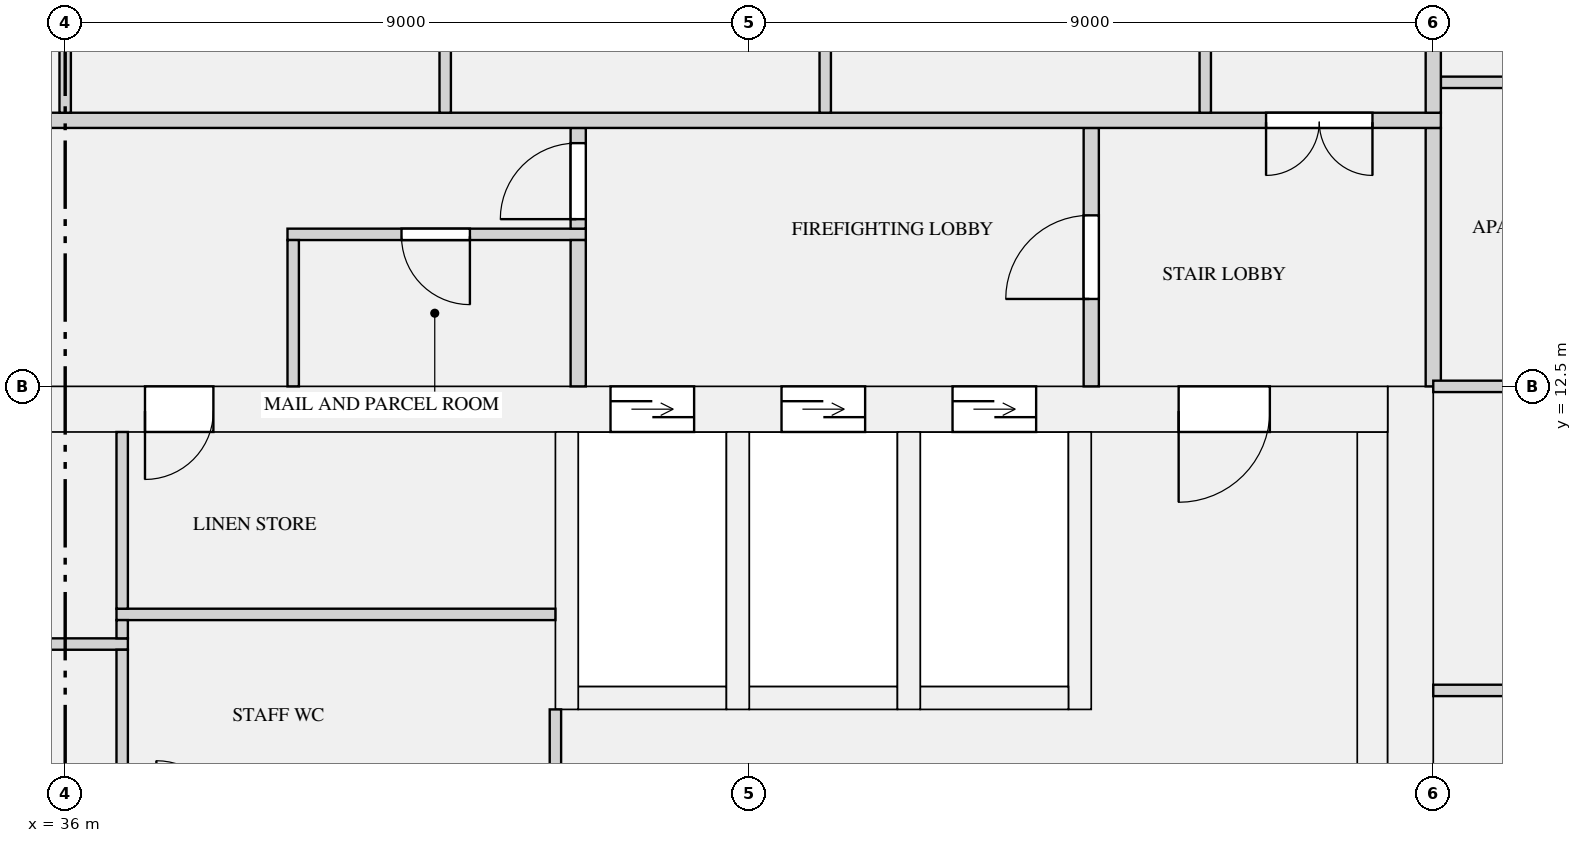
"""IFC4 building model, lengths in metres.
Left out: names, types, materials, properties, quantities, classifications, styles, units other than length and angle.
Written with IfcOpenShell. Run it as: python <this file> out.ifc"""

import sys

from ifc_helpers import new_model, si_unit, direction, frame, frame_2d, origin, place, context, subcontext, project, spatial, rectangle, extrude, element, fill, save


model = new_model("IFC4")
c1 = context("Model", 3, precision=1e-05, world=origin(), true_north=direction((0.0, 1.0)))
c2 = subcontext(c1, "Body", "Model", "MODEL_VIEW")
j1 = project(units=[si_unit("LENGTHUNIT", "METRE"), si_unit("PLANEANGLEUNIT", "RADIAN")], contexts=[c1])
p1 = place(None, origin())
s1 = spatial("IfcSite", under=j1, at=p1, CompositionType="ELEMENT")
p2 = place(p1, origin())
s2 = spatial("IfcBuilding", under=s1, at=p2, CompositionType="ELEMENT")
p3 = place(p2, frame((0.0, 0.0, 207.45)))
s3 = spatial("IfcBuildingStorey", under=s2, at=p3, CompositionType="ELEMENT", Elevation=207.45)
p4 = place(p3, frame((53.7, 0.0, 0.0), z_axis=(0.0, 0.0, 1.0), x_axis=(0.0, 1.0, 0.0)))
e1 = element("IfcWall", 1, at=p4, inside=s3, PredefinedType="SHEAR", context=c2, shape_type="SweptSolid", body=[
    extrude(rectangle(XDim=12.5, YDim=0.6, at=frame_2d((6.25, 0.0))), origin(), (0.0, 0.0, 1.0), 3.15),
])
p5 = place(p3, frame((18.6, 12.2, 0.0), z_axis=(0.0, 0.0, 1.0), x_axis=(1.0, 0.0, 0.0)))
e2 = element("IfcWall", 2, at=p5, inside=s3, PredefinedType="SHEAR", context=c2, shape_type="SweptSolid", body=[
    extrude(rectangle(XDim=34.8, YDim=0.6, at=frame_2d((17.4, 0.0))), origin(), (0.0, 0.0, 1.0), 3.15),
])
p6 = place(p5, frame((24.575, 0.0, 0.0)))
e3 = element("IfcOpeningElement", 3, at=p6, cuts=e2, PredefinedType="OPENING", context=c2, shape_type="SweptSolid", body=[
    extrude(rectangle(XDim=1.1, YDim=2.1, at=frame_2d((0.55, 1.05))), frame((0.0, 0.31, 0.0), z_axis=(0.0, -1.0, 0.0), x_axis=(1.0, 0.0, 0.0)), (0.0, 0.0, 1.0), 0.62),
])
p7 = place(p5, frame((26.825, 0.0, 0.0)))
e4 = element("IfcOpeningElement", 4, at=p7, cuts=e2, PredefinedType="OPENING", context=c2, shape_type="SweptSolid", body=[
    extrude(rectangle(XDim=1.1, YDim=2.1, at=frame_2d((0.55, 1.05))), frame((0.0, 0.31, 0.0), z_axis=(0.0, -1.0, 0.0), x_axis=(1.0, 0.0, 0.0)), (0.0, 0.0, 1.0), 0.62),
])
p8 = place(p5, frame((29.075, 0.0, 0.0)))
e5 = element("IfcOpeningElement", 5, at=p8, cuts=e2, PredefinedType="OPENING", context=c2, shape_type="SweptSolid", body=[
    extrude(rectangle(XDim=1.1, YDim=2.1, at=frame_2d((0.55, 1.05))), frame((0.0, 0.31, 0.0), z_axis=(0.0, -1.0, 0.0), x_axis=(1.0, 0.0, 0.0)), (0.0, 0.0, 1.0), 0.62),
])
p9 = place(p5, frame((4.95, 0.0, 0.0)))
e6 = element("IfcOpeningElement", 6, at=p9, cuts=e2, PredefinedType="OPENING", context=c2, shape_type="SweptSolid", body=[
    extrude(rectangle(XDim=0.9, YDim=2.1, at=frame_2d((0.45, 1.05))), frame((0.0, 0.31, 0.0), z_axis=(0.0, -1.0, 0.0), x_axis=(1.0, 0.0, 0.0)), (0.0, 0.0, 1.0), 0.62),
])
p10 = place(p5, frame((13.95, 0.0, 0.0)))
e7 = element("IfcOpeningElement", 7, at=p10, cuts=e2, PredefinedType="OPENING", context=c2, shape_type="SweptSolid", body=[
    extrude(rectangle(XDim=0.9, YDim=2.1, at=frame_2d((0.45, 1.05))), frame((0.0, 0.31, 0.0), z_axis=(0.0, -1.0, 0.0), x_axis=(1.0, 0.0, 0.0)), (0.0, 0.0, 1.0), 0.62),
])
p11 = place(p5, frame((18.45, 0.0, 0.0)))
e8 = element("IfcOpeningElement", 8, at=p11, cuts=e2, PredefinedType="OPENING", context=c2, shape_type="SweptSolid", body=[
    extrude(rectangle(XDim=0.9, YDim=2.1, at=frame_2d((0.45, 1.05))), frame((0.0, 0.31, 0.0), z_axis=(0.0, -1.0, 0.0), x_axis=(1.0, 0.0, 0.0)), (0.0, 0.0, 1.0), 0.62),
])
p12 = place(p5, frame((1.55, 0.0, 0.0)))
e9 = element("IfcOpeningElement", 9, at=p12, cuts=e2, PredefinedType="OPENING", context=c2, shape_type="SweptSolid", body=[
    extrude(rectangle(XDim=1.2, YDim=2.1, at=frame_2d((0.6, 1.05))), frame((0.0, 0.31, 0.0), z_axis=(0.0, -1.0, 0.0), x_axis=(1.0, 0.0, 0.0)), (0.0, 0.0, 1.0), 0.62),
])
p13 = place(p5, frame((32.05, 0.0, 0.0)))
e10 = element("IfcOpeningElement", 10, at=p13, cuts=e2, PredefinedType="OPENING", context=c2, shape_type="SweptSolid", body=[
    extrude(rectangle(XDim=1.2, YDim=2.1, at=frame_2d((0.6, 1.05))), frame((0.0, 0.31, 0.0), z_axis=(0.0, -1.0, 0.0), x_axis=(1.0, 0.0, 0.0)), (0.0, 0.0, 1.0), 0.62),
])
p14 = place(p3, frame((53.2, 1.0, 0.0), z_axis=(0.0, 0.0, 1.0), x_axis=(0.0, 1.0, 0.0)))
e11 = element("IfcWall", 11, at=p14, inside=s3, PredefinedType="SHEAR", context=c2, shape_type="SweptSolid", body=[
    extrude(rectangle(XDim=10.9, YDim=0.4, at=frame_2d((5.45, 0.0))), origin(), (0.0, 0.0, 1.0), 3.15),
])
p15 = place(p3, frame((42.75, 8.4, 0.0), z_axis=(0.0, 0.0, 1.0), x_axis=(1.0, 0.0, 0.0)))
e12 = element("IfcWall", 12, at=p15, inside=s3, PredefinedType="SHEAR", context=c2, shape_type="SweptSolid", body=[
    extrude(rectangle(XDim=1.95, YDim=0.3, at=frame_2d((0.975, 0.0))), origin(), (0.0, 0.0, 1.0), 3.15),
])
p16 = place(p3, frame((42.6, 8.25, 0.0), z_axis=(0.0, 0.0, 1.0), x_axis=(0.0, 1.0, 0.0)))
e13 = element("IfcWall", 13, at=p16, inside=s3, PredefinedType="SHEAR", context=c2, shape_type="SweptSolid", body=[
    extrude(rectangle(XDim=3.65, YDim=0.3, at=frame_2d((1.825, 0.0))), origin(), (0.0, 0.0, 1.0), 3.15),
])
p17 = place(p3, frame((45.0, 8.4, 0.0), z_axis=(0.0, 0.0, 1.0), x_axis=(1.0, 0.0, 0.0)))
e14 = element("IfcWall", 14, at=p17, inside=s3, PredefinedType="SHEAR", context=c2, shape_type="SweptSolid", body=[
    extrude(rectangle(XDim=1.95, YDim=0.3, at=frame_2d((0.975, 0.0))), origin(), (0.0, 0.0, 1.0), 3.15),
])
p18 = place(p3, frame((44.85, 8.25, 0.0), z_axis=(0.0, 0.0, 1.0), x_axis=(0.0, 1.0, 0.0)))
e15 = element("IfcWall", 15, at=p18, inside=s3, PredefinedType="SHEAR", context=c2, shape_type="SweptSolid", body=[
    extrude(rectangle(XDim=3.65, YDim=0.3, at=frame_2d((1.825, 0.0))), origin(), (0.0, 0.0, 1.0), 3.15),
])
p19 = place(p3, frame((47.25, 8.4, 0.0), z_axis=(0.0, 0.0, 1.0), x_axis=(1.0, 0.0, 0.0)))
e16 = element("IfcWall", 16, at=p19, inside=s3, PredefinedType="SHEAR", context=c2, shape_type="SweptSolid", body=[
    extrude(rectangle(XDim=1.95, YDim=0.3, at=frame_2d((0.975, 0.0))), origin(), (0.0, 0.0, 1.0), 3.15),
])
for number, where, z_axis, x_axis in (
    (17, (47.1, 8.25, 0.0), (0.0, 0.0, 1.0), (0.0, 1.0, 0.0)),
    (18, (49.35, 8.25, 0.0), (0.0, 0.0, 1.0), (0.0, 1.0, 0.0)),
):
    element("IfcWall", number, at=place(p3, frame(where, z_axis=z_axis, x_axis=x_axis)), inside=s3, PredefinedType="SHEAR", context=c2, shape_type="SweptSolid", body=[
        extrude(rectangle(XDim=3.65, YDim=0.3, at=frame_2d((1.825, 0.0))), origin(), (0.0, 0.0, 1.0), 3.15),
    ])
p20 = place(p3, frame((22.725, 9.11, 0.0), z_axis=(0.0, 0.0, 1.0), x_axis=(1.0, 0.0, 0.0)))
e19 = element("IfcWall", 19, at=p20, inside=s3, PredefinedType="PARTITIONING", context=c2, shape_type="SweptSolid", body=[
    extrude(rectangle(XDim=14.1, YDim=0.15, at=frame_2d((7.05, 0.0))), origin(), (0.0, 0.0, 1.0), 2.83),
])
p21 = place(p3, frame((36.675, 9.5, 0.0), z_axis=(0.0, 0.0, 1.0), x_axis=(1.0, 0.0, 0.0)))
e20 = element("IfcWall", 20, at=p21, inside=s3, PredefinedType="PARTITIONING", context=c2, shape_type="SweptSolid", body=[
    extrude(rectangle(XDim=5.775, YDim=0.15, at=frame_2d((2.887, 0.0))), origin(), (0.0, 0.0, 1.0), 2.83),
])
p22 = place(p3, frame((38.925, 14.5, 0.0), z_axis=(0.0, 0.0, 1.0), x_axis=(1.0, 0.0, 0.0)))
e21 = element("IfcWall", 21, at=p22, inside=s3, PredefinedType="PARTITIONING", context=c2, shape_type="SweptSolid", body=[
    extrude(rectangle(XDim=3.925, YDim=0.15, at=frame_2d((1.962, 0.0))), origin(), (0.0, 0.0, 1.0), 2.83),
])
p23 = place(p22, frame((1.5, 0.0, 0.0)))
e22 = element("IfcOpeningElement", 22, at=p23, cuts=e21, PredefinedType="OPENING", context=c2, shape_type="SweptSolid", body=[
    extrude(rectangle(XDim=0.9, YDim=2.1, at=frame_2d((0.45, 1.05))), frame((0.0, 0.085, 0.0), z_axis=(0.0, -1.0, 0.0), x_axis=(1.0, 0.0, 0.0)), (0.0, 0.0, 1.0), 0.17),
])
p24 = place(p3, frame((42.45, 6.65, 0.0), z_axis=(0.0, 0.0, 1.0), x_axis=(0.0, 1.0, 0.0)))
e23 = element("IfcWall", 23, at=p24, inside=s3, PredefinedType="PARTITIONING", context=c2, shape_type="SweptSolid", body=[
    extrude(rectangle(XDim=1.6, YDim=0.15, at=frame_2d((0.8, 0.0))), origin(), (0.0, 0.0, 1.0), 2.83),
])
p25 = place(p3, frame((36.75, 6.725, 0.0), z_axis=(0.0, 0.0, 1.0), x_axis=(0.0, 1.0, 0.0)))
e24 = element("IfcWall", 24, at=p25, inside=s3, PredefinedType="PARTITIONING", context=c2, shape_type="SweptSolid", body=[
    extrude(rectangle(XDim=2.31, YDim=0.15, at=frame_2d((1.155, 0.0))), origin(), (0.0, 0.0, 1.0), 2.83),
])
p26 = place(p3, frame((36.75, 9.185, 0.0), z_axis=(0.0, 0.0, 1.0), x_axis=(0.0, 1.0, 0.0)))
e25 = element("IfcWall", 25, at=p26, inside=s3, PredefinedType="PARTITIONING", context=c2, shape_type="SweptSolid", body=[
    extrude(rectangle(XDim=0.24, YDim=0.15, at=frame_2d((0.12, 0.0))), origin(), (0.0, 0.0, 1.0), 2.83),
])
p27 = place(p3, frame((36.75, 9.575, 0.0), z_axis=(0.0, 0.0, 1.0), x_axis=(0.0, 1.0, 0.0)))
e26 = element("IfcWall", 26, at=p27, inside=s3, PredefinedType="PARTITIONING", context=c2, shape_type="SweptSolid", body=[
    extrude(rectangle(XDim=2.325, YDim=0.15, at=frame_2d((1.163, 0.0))), origin(), (0.0, 0.0, 1.0), 2.83),
])
p28 = place(p3, frame((39.0, 12.5, 0.0), z_axis=(0.0, 0.0, 1.0), x_axis=(0.0, 1.0, 0.0)))
e27 = element("IfcWall", 27, at=p28, inside=s3, PredefinedType="PARTITIONING", context=c2, shape_type="SweptSolid", body=[
    extrude(rectangle(XDim=1.925, YDim=0.15, at=frame_2d((0.962, 0.0))), origin(), (0.0, 0.0, 1.0), 2.83),
])
p29 = place(p3, frame((42.75, 12.5, 0.0), z_axis=(0.0, 0.0, 1.0), x_axis=(0.0, 1.0, 0.0)))
e28 = element("IfcWall", 28, at=p29, inside=s3, PredefinedType="PARTITIONING", context=c2, shape_type="SweptSolid", body=[
    extrude(rectangle(XDim=1.925, YDim=0.2, at=frame_2d((0.962, 0.0))), origin(), (0.0, 0.0, 1.0), 2.83),
])
p30 = place(p3, frame((49.5, 12.5, 0.0), z_axis=(0.0, 0.0, 1.0), x_axis=(0.0, 1.0, 0.0)))
e29 = element("IfcWall", 29, at=p30, inside=s3, PredefinedType="PARTITIONING", context=c2, shape_type="SweptSolid", body=[
    extrude(rectangle(XDim=3.4, YDim=0.2, at=frame_2d((1.7, 0.0))), origin(), (0.0, 0.0, 1.0), 2.83),
])
p31 = place(p30, frame((1.15, 0.0, 0.0)))
e30 = element("IfcOpeningElement", 30, at=p31, cuts=e29, PredefinedType="OPENING", context=c2, shape_type="SweptSolid", body=[
    extrude(rectangle(XDim=1.1, YDim=2.1, at=frame_2d((0.55, 1.05))), frame((0.0, 0.11, 0.0), z_axis=(0.0, -1.0, 0.0), x_axis=(1.0, 0.0, 0.0)), (0.0, 0.0, 1.0), 0.22),
])
p32 = place(p3, frame((54.0, 12.5, 0.0), z_axis=(0.0, 0.0, 1.0), x_axis=(0.0, 1.0, 0.0)))
e31 = element("IfcWall", 31, at=p32, inside=s3, PredefinedType="PARTITIONING", context=c2, shape_type="SweptSolid", body=[
    extrude(rectangle(XDim=3.4, YDim=0.2, at=frame_2d((1.7, 0.0))), origin(), (0.0, 0.0, 1.0), 2.83),
])
p33 = place(p3, frame((42.75, 14.575, 0.0), z_axis=(0.0, 0.0, 1.0), x_axis=(0.0, 1.0, 0.0)))
e32 = element("IfcWall", 32, at=p33, inside=s3, PredefinedType="PARTITIONING", context=c2, shape_type="SweptSolid", body=[
    extrude(rectangle(XDim=1.325, YDim=0.2, at=frame_2d((0.663, 0.0))), origin(), (0.0, 0.0, 1.0), 2.83),
])
p34 = place(p33, frame((0.125, 0.0, 0.0)))
e33 = element("IfcOpeningElement", 33, at=p34, cuts=e32, PredefinedType="OPENING", context=c2, shape_type="SweptSolid", body=[
    extrude(rectangle(XDim=1.0, YDim=2.1, at=frame_2d((0.5, 1.05))), frame((0.0, 0.11, 0.0), z_axis=(0.0, -1.0, 0.0), x_axis=(1.0, 0.0, 0.0)), (0.0, 0.0, 1.0), 0.22),
])
p35 = place(p3, frame((54.0, 12.5, 0.0), z_axis=(0.0, 0.0, 1.0), x_axis=(1.0, 0.0, 0.0)))
e34 = element("IfcWall", 34, at=p35, inside=s3, PredefinedType="PARTITIONING", context=c2, shape_type="SweptSolid", body=[
    extrude(rectangle(XDim=17.35, YDim=0.15, at=frame_2d((8.675, 0.0))), origin(), (0.0, 0.0, 1.0), 2.83),
])
p36 = place(p35, frame((3.825, 0.0, 0.0)))
e35 = element("IfcOpeningElement", 35, at=p36, cuts=e34, PredefinedType="OPENING", context=c2, shape_type="SweptSolid", body=[
    extrude(rectangle(XDim=0.9, YDim=2.1, at=frame_2d((0.45, 1.05))), frame((0.0, 0.085, 0.0), z_axis=(0.0, -1.0, 0.0), x_axis=(1.0, 0.0, 0.0)), (0.0, 0.0, 1.0), 0.17),
])
p37 = place(p35, frame((13.025, 0.0, 0.0)))
e36 = element("IfcOpeningElement", 36, at=p37, cuts=e34, PredefinedType="OPENING", context=c2, shape_type="SweptSolid", body=[
    extrude(rectangle(XDim=0.9, YDim=2.1, at=frame_2d((0.45, 1.05))), frame((0.0, 0.085, 0.0), z_axis=(0.0, -1.0, 0.0), x_axis=(1.0, 0.0, 0.0)), (0.0, 0.0, 1.0), 0.17),
])
p38 = place(p3, frame((54.0, 8.5, 0.0), z_axis=(0.0, 0.0, 1.0), x_axis=(1.0, 0.0, 0.0)))
e37 = element("IfcWall", 37, at=p38, inside=s3, PredefinedType="PARTITIONING", context=c2, shape_type="SweptSolid", body=[
    extrude(rectangle(XDim=17.35, YDim=0.15, at=frame_2d((8.675, 0.0))), origin(), (0.0, 0.0, 1.0), 2.83),
])
p39 = place(p38, frame((4.05, 0.0, 0.0)))
e38 = element("IfcOpeningElement", 38, at=p39, cuts=e37, PredefinedType="OPENING", context=c2, shape_type="SweptSolid", body=[
    extrude(rectangle(XDim=0.9, YDim=2.1, at=frame_2d((0.45, 1.05))), frame((0.0, 0.085, 0.0), z_axis=(0.0, -1.0, 0.0), x_axis=(1.0, 0.0, 0.0)), (0.0, 0.0, 1.0), 0.17),
])
p40 = place(p3, frame((54.1, 16.5, 0.0), z_axis=(0.0, 0.0, 1.0), x_axis=(1.0, 0.0, 0.0)))
e39 = element("IfcWall", 39, at=p40, inside=s3, PredefinedType="PARTITIONING", context=c2, shape_type="SweptSolid", body=[
    extrude(rectangle(XDim=14.75, YDim=0.15, at=frame_2d((7.375, 0.0))), origin(), (0.0, 0.0, 1.0), 2.83),
])
p41 = place(p40, frame((1.4, 0.0, 0.0)))
e40 = element("IfcOpeningElement", 40, at=p41, cuts=e39, PredefinedType="OPENING", context=c2, shape_type="SweptSolid", body=[
    extrude(rectangle(XDim=1.5, YDim=2.1, at=frame_2d((0.75, 1.05))), frame((0.0, 0.085, 0.0), z_axis=(0.0, -1.0, 0.0), x_axis=(1.0, 0.0, 0.0)), (0.0, 0.0, 1.0), 0.17),
])
p42 = place(p40, frame((6.2, 0.0, 0.0)))
e41 = element("IfcOpeningElement", 41, at=p42, cuts=e39, PredefinedType="OPENING", context=c2, shape_type="SweptSolid", body=[
    extrude(rectangle(XDim=0.9, YDim=2.1, at=frame_2d((0.45, 1.05))), frame((0.0, 0.085, 0.0), z_axis=(0.0, -1.0, 0.0), x_axis=(1.0, 0.0, 0.0)), (0.0, 0.0, 1.0), 0.17),
])
p43 = place(p40, frame((11.45, 0.0, 0.0)))
e42 = element("IfcOpeningElement", 42, at=p43, cuts=e39, PredefinedType="OPENING", context=c2, shape_type="SweptSolid", body=[
    extrude(rectangle(XDim=0.9, YDim=2.1, at=frame_2d((0.45, 1.05))), frame((0.0, 0.085, 0.0), z_axis=(0.0, -1.0, 0.0), x_axis=(1.0, 0.0, 0.0)), (0.0, 0.0, 1.0), 0.17),
])
p44 = place(p3, frame((17.9, 16.0, 0.0), z_axis=(0.0, 0.0, 1.0), x_axis=(1.0, 0.0, 0.0)))
e43 = element("IfcWall", 43, at=p44, inside=s3, PredefinedType="PARTITIONING", context=c2, shape_type="SweptSolid", body=[
    extrude(rectangle(XDim=36.2, YDim=0.2, at=frame_2d((18.1, 0.0))), origin(), (0.0, 0.0, 1.0), 2.83),
])
p45 = place(p44, frame((0.9, 0.0, 0.0)))
e44 = element("IfcOpeningElement", 44, at=p45, cuts=e43, PredefinedType="OPENING", context=c2, shape_type="SweptSolid", body=[
    extrude(rectangle(XDim=1.4, YDim=2.1, at=frame_2d((0.7, 1.05))), frame((0.0, 0.11, 0.0), z_axis=(0.0, -1.0, 0.0), x_axis=(1.0, 0.0, 0.0)), (0.0, 0.0, 1.0), 0.22),
])
p46 = place(p44, frame((33.9, 0.0, 0.0)))
e45 = element("IfcOpeningElement", 45, at=p46, cuts=e43, PredefinedType="OPENING", context=c2, shape_type="SweptSolid", body=[
    extrude(rectangle(XDim=1.4, YDim=2.1, at=frame_2d((0.7, 1.05))), frame((0.0, 0.11, 0.0), z_axis=(0.0, -1.0, 0.0), x_axis=(1.0, 0.0, 0.0)), (0.0, 0.0, 1.0), 0.22),
])
p47 = place(p3, frame((54.0, 16.1, 0.0), z_axis=(0.0, 0.0, 1.0), x_axis=(0.0, 1.0, 0.0)))
e46 = element("IfcWall", 46, at=p47, inside=s3, PredefinedType="PARTITIONING", context=c2, shape_type="SweptSolid", body=[
    extrude(rectangle(XDim=7.8, YDim=0.2, at=frame_2d((3.9, 0.0))), origin(), (0.0, 0.0, 1.0), 2.83),
])
p48 = place(p47, frame((1.85, 0.0, 0.0)))
e47 = element("IfcOpeningElement", 47, at=p48, cuts=e46, PredefinedType="OPENING", context=c2, shape_type="SweptSolid", body=[
    extrude(rectangle(XDim=1.1, YDim=2.1, at=frame_2d((0.55, 1.05))), frame((0.0, 0.11, 0.0), z_axis=(0.0, -1.0, 0.0), x_axis=(1.0, 0.0, 0.0)), (0.0, 0.0, 1.0), 0.22),
])
for number, where, z_axis, x_axis in (
    (48, (51.0, 16.1, 0.0), (0.0, 0.0, 1.0), (0.0, 1.0, 0.0)),
    (49, (36.0, 16.1, 0.0), (0.0, 0.0, 1.0), (0.0, 1.0, 0.0)),
    (50, (41.0, 16.1, 0.0), (0.0, 0.0, 1.0), (0.0, 1.0, 0.0)),
    (51, (46.0, 16.1, 0.0), (0.0, 0.0, 1.0), (0.0, 1.0, 0.0)),
):
    element("IfcWall", number, at=place(p3, frame(where, z_axis=z_axis, x_axis=x_axis)), inside=s3, PredefinedType="PARTITIONING", context=c2, shape_type="SweptSolid", body=[
        extrude(rectangle(XDim=4.825, YDim=0.15, at=frame_2d((2.413, 0.0))), origin(), (0.0, 0.0, 1.0), 2.83),
    ])
p49 = place(p6, origin())
e52 = element("IfcDoor", 52, at=p49, inside=s3, OperationType="DOUBLE_DOOR_SLIDING", PredefinedType="DOOR", context=c2, shape_type="SweptSolid", body=[
    extrude(rectangle(XDim=1.1, YDim=2.1, at=frame_2d((0.55, 1.05))), frame((0.0, 0.025, 0.0), z_axis=(0.0, -1.0, 0.0), x_axis=(1.0, 0.0, 0.0)), (0.0, 0.0, 1.0), 0.05),
])
fill(e3, e52)
p50 = place(p7, origin())
e53 = element("IfcDoor", 53, at=p50, inside=s3, OperationType="DOUBLE_DOOR_SLIDING", PredefinedType="DOOR", context=c2, shape_type="SweptSolid", body=[
    extrude(rectangle(XDim=1.1, YDim=2.1, at=frame_2d((0.55, 1.05))), frame((0.0, 0.025, 0.0), z_axis=(0.0, -1.0, 0.0), x_axis=(1.0, 0.0, 0.0)), (0.0, 0.0, 1.0), 0.05),
])
fill(e4, e53)
p51 = place(p8, origin())
e54 = element("IfcDoor", 54, at=p51, inside=s3, OperationType="DOUBLE_DOOR_SLIDING", PredefinedType="DOOR", context=c2, shape_type="SweptSolid", body=[
    extrude(rectangle(XDim=1.1, YDim=2.1, at=frame_2d((0.55, 1.05))), frame((0.0, 0.025, 0.0), z_axis=(0.0, -1.0, 0.0), x_axis=(1.0, 0.0, 0.0)), (0.0, 0.0, 1.0), 0.05),
])
fill(e5, e54)
p52 = place(p23, frame((0.9, 0.0, 0.0), z_axis=(0.0, 0.0, 1.0), x_axis=(-1.0, 0.0, 0.0)))
e55 = element("IfcDoor", 55, at=p52, inside=s3, OperationType="SINGLE_SWING_LEFT", PredefinedType="DOOR", context=c2, shape_type="SweptSolid", body=[
    extrude(rectangle(XDim=0.9, YDim=2.1, at=frame_2d((0.45, 1.05))), frame((0.0, 0.025, 0.0), z_axis=(0.0, -1.0, 0.0), x_axis=(1.0, 0.0, 0.0)), (0.0, 0.0, 1.0), 0.05),
])
fill(e22, e55)
p53 = place(p11, frame((0.9, 0.0, 0.0), z_axis=(0.0, 0.0, 1.0), x_axis=(-1.0, 0.0, 0.0)))
e56 = element("IfcDoor", 56, at=p53, inside=s3, OperationType="SINGLE_SWING_RIGHT", PredefinedType="DOOR", context=c2, shape_type="SweptSolid", body=[
    extrude(rectangle(XDim=0.9, YDim=2.1, at=frame_2d((0.45, 1.05))), frame((0.0, 0.025, 0.0), z_axis=(0.0, -1.0, 0.0), x_axis=(1.0, 0.0, 0.0)), (0.0, 0.0, 1.0), 0.05),
])
fill(e8, e56)
p54 = place(p13, frame((1.2, 0.0, 0.0), z_axis=(0.0, 0.0, 1.0), x_axis=(-1.0, 0.0, 0.0)))
e57 = element("IfcDoor", 57, at=p54, inside=s3, OperationType="SINGLE_SWING_RIGHT", PredefinedType="DOOR", context=c2, shape_type="SweptSolid", body=[
    extrude(rectangle(XDim=1.2, YDim=2.1, at=frame_2d((0.6, 1.05))), frame((0.0, 0.025, 0.0), z_axis=(0.0, -1.0, 0.0), x_axis=(1.0, 0.0, 0.0)), (0.0, 0.0, 1.0), 0.05),
])
fill(e10, e57)
p55 = place(p34, origin())
e58 = element("IfcDoor", 58, at=p55, inside=s3, OperationType="SINGLE_SWING_LEFT", PredefinedType="DOOR", context=c2, shape_type="SweptSolid", body=[
    extrude(rectangle(XDim=1.0, YDim=2.1, at=frame_2d((0.5, 1.05))), frame((0.0, 0.025, 0.0), z_axis=(0.0, -1.0, 0.0), x_axis=(1.0, 0.0, 0.0)), (0.0, 0.0, 1.0), 0.05),
])
fill(e33, e58)
p56 = place(p31, origin())
e59 = element("IfcDoor", 59, at=p56, inside=s3, OperationType="SINGLE_SWING_LEFT", PredefinedType="DOOR", context=c2, shape_type="SweptSolid", body=[
    extrude(rectangle(XDim=1.1, YDim=2.1, at=frame_2d((0.55, 1.05))), frame((0.0, 0.025, 0.0), z_axis=(0.0, -1.0, 0.0), x_axis=(1.0, 0.0, 0.0)), (0.0, 0.0, 1.0), 0.05),
])
fill(e30, e59)
p57 = place(p46, frame((1.4, 0.0, 0.0), z_axis=(0.0, 0.0, 1.0), x_axis=(-1.0, 0.0, 0.0)))
e60 = element("IfcDoor", 60, at=p57, inside=s3, OperationType="DOUBLE_DOOR_SINGLE_SWING", PredefinedType="DOOR", context=c2, shape_type="SweptSolid", body=[
    extrude(rectangle(XDim=1.4, YDim=2.1, at=frame_2d((0.7, 1.05))), frame((0.0, 0.025, 0.0), z_axis=(0.0, -1.0, 0.0), x_axis=(1.0, 0.0, 0.0)), (0.0, 0.0, 1.0), 0.05),
])
fill(e45, e60)
save(model, sys.argv[1])
